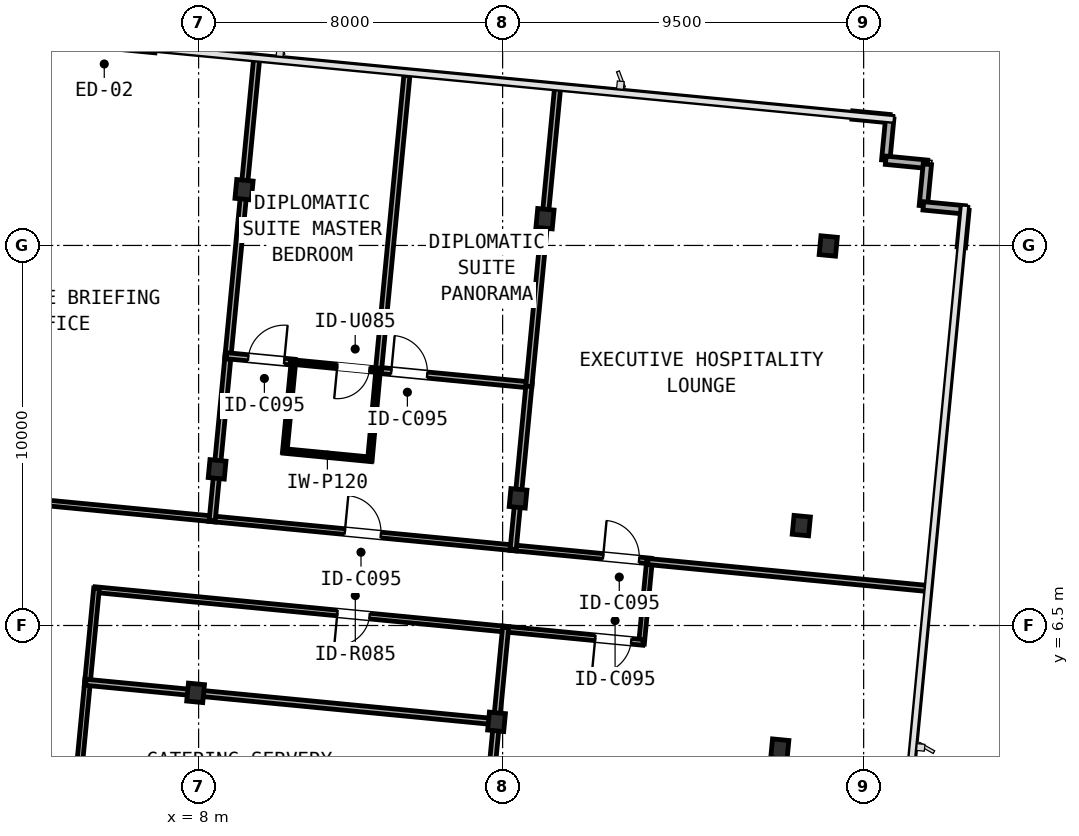
"""IFC4 building model, lengths in metres.
Left out: names, types, materials, properties, quantities, classifications, styles, units other than length and angle.
Written with IfcOpenShell. Run it as: python <this file> out.ifc"""

import sys

from ifc_helpers import new_model, si_unit, direction, frame, frame_2d, origin, origin_2d, place, context, subcontext, project, spatial, rectangle, i_section, extrude, element, fill, save


model = new_model("IFC4")
c1 = context("Model", 3, precision=1e-05, world=origin(), true_north=direction((0.0, 1.0)))
c2 = subcontext(c1, "Body", "Model", "MODEL_VIEW")
j1 = project(units=[si_unit("LENGTHUNIT", "METRE"), si_unit("PLANEANGLEUNIT", "RADIAN")], contexts=[c1])
p1 = place(None, origin())
s1 = spatial("IfcSite", under=j1, at=p1, CompositionType="ELEMENT")
p2 = place(p1, origin())
s2 = spatial("IfcBuilding", under=s1, at=p2, CompositionType="ELEMENT")
p3 = place(p2, frame((0.0, 0.0, 160.05)))
s3 = spatial("IfcBuildingStorey", under=s2, at=p3, CompositionType="ELEMENT", Elevation=160.05)
for number, where, z_axis, x_axis in (
    (1, (7.921, 4.728, 0.0), (0.0, 0.0, 1.0), (0.995, -0.096, 0.0)),
    (2, (8.487, 10.609, 0.0), (0.0, 0.0, 1.0), (0.995, -0.096, 0.0)),
):
    element("IfcColumn", number, at=place(p3, frame(where, z_axis=z_axis, x_axis=x_axis)), inside=s3, PredefinedType="COLUMN", context=c2, shape_type="SweptSolid", body=[
        extrude(i_section(OverallWidth=0.424, OverallDepth=0.474, WebThickness=0.048, FlangeThickness=0.077, FilletRadius=0.031, at=origin_2d()), origin(), (0.0, 0.0, 1.0), 3.45),
    ])
p4 = place(p3, frame((9.195, 17.967, 0.0), z_axis=(0.0, 0.0, 1.0), x_axis=(0.995396198367, -0.09584575252, 0.0)))
e3 = element("IfcColumn", 3, at=p4, inside=s3, PredefinedType="COLUMN", context=c2, shape_type="SweptSolid", body=[
    extrude(i_section(OverallWidth=0.432, OverallDepth=0.498, WebThickness=0.056, FlangeThickness=0.089, FilletRadius=0.031, at=origin_2d()), origin(), (0.0, 0.0, 1.0), 3.45),
])
for number, where, z_axis, x_axis in (
    (4, (15.84, 3.965, 0.0), (0.0, 0.0, 1.0), (0.995, -0.096, 0.0)),
    (5, (16.406, 9.846, 0.0), (0.0, 0.0, 1.0), (0.995, -0.096, 0.0)),
):
    element("IfcColumn", number, at=place(p3, frame(where, z_axis=z_axis, x_axis=x_axis)), inside=s3, PredefinedType="COLUMN", context=c2, shape_type="SweptSolid", body=[
        extrude(i_section(OverallWidth=0.424, OverallDepth=0.474, WebThickness=0.048, FlangeThickness=0.077, FilletRadius=0.031, at=origin_2d()), origin(), (0.0, 0.0, 1.0), 3.45),
    ])
for number, where, z_axis, x_axis in (
    (6, (17.115, 17.204, 0.0), (0.0, 0.0, 1.0), (0.995, -0.096, 0.0)),
    (7, (23.293, 3.248, 0.0), (0.0, 0.0, 1.0), (0.995, -0.096, 0.0)),
    (8, (23.86, 9.128, 0.0), (0.0, 0.0, 1.0), (0.995, -0.096, 0.0)),
    (9, (24.568, 16.486, 0.0), (0.0, 0.0, 1.0), (0.995, -0.096, 0.0)),
):
    element("IfcColumn", number, at=place(p3, frame(where, z_axis=z_axis, x_axis=x_axis)), inside=s3, PredefinedType="COLUMN", context=c2, shape_type="SweptSolid", body=[
        extrude(i_section(OverallWidth=0.432, OverallDepth=0.498, WebThickness=0.056, FlangeThickness=0.089, FilletRadius=0.031, at=origin_2d()), origin(), (0.0, 0.0, 1.0), 3.45),
    ])
p5 = place(p3, frame((4.275, 21.937, 0.0), z_axis=(0.0, 0.0, 1.0), x_axis=(0.995394049959, -0.095868061976, 0.0)))
e10 = element("IfcWall", 10, at=p5, inside=s3, PredefinedType="STANDARD", context=c2, shape_type="SweptSolid", body=[
    extrude(rectangle(XDim=2.6, YDim=0.24, at=frame_2d((1.3, 0.0))), origin(), (0.0, 0.0, 1.0), 3.19),
])
p6 = place(p5, frame((0.75, 0.0, 0.0)))
e11 = element("IfcOpeningElement", 11, at=p6, cuts=e10, PredefinedType="OPENING", context=c2, shape_type="SweptSolid", body=[
    extrude(rectangle(XDim=1.1, YDim=2.15, at=frame_2d((0.55, 1.075))), frame((0.0, 0.13, 0.0), z_axis=(0.0, -1.0, 0.0), x_axis=(1.0, 0.0, 0.0)), (0.0, 0.0, 1.0), 0.26),
])
p7 = place(p3, frame((25.201, 19.931, 0.0), z_axis=(0.0, 0.0, 1.0), x_axis=(0.99541083642, -0.095693608655, 0.0)))
e12 = element("IfcWall", 12, at=p7, inside=s3, PredefinedType="STANDARD", context=c2, shape_type="SweptSolid", body=[
    extrude(rectangle(XDim=0.99, YDim=0.22, at=frame_2d((0.495, 0.0))), origin(), (0.0, 0.0, 1.0), 3.19),
])
p8 = place(p3, frame((26.187, 19.837, 0.0), z_axis=(0.0, 0.0, 1.0), x_axis=(-0.095657429048, -0.995414313875, 0.0)))
e13 = element("IfcWall", 13, at=p8, inside=s3, PredefinedType="STANDARD", context=c2, shape_type="SweptSolid", body=[
    extrude(rectangle(XDim=1.1, YDim=0.22, at=frame_2d((0.55, 0.0))), origin(), (0.0, 0.0, 1.0), 3.19),
])
p9 = place(p3, frame((26.082, 18.742, 0.0), z_axis=(0.0, 0.0, 1.0), x_axis=(0.995391116058, -0.095898519656, 0.0)))
e14 = element("IfcWall", 14, at=p9, inside=s3, PredefinedType="STANDARD", context=c2, shape_type="SweptSolid", body=[
    extrude(rectangle(XDim=1.1, YDim=0.22, at=frame_2d((0.55, 0.0))), origin(), (0.0, 0.0, 1.0), 3.19),
])
p10 = place(p3, frame((27.176, 18.636, 0.0), z_axis=(0.0, 0.0, 1.0), x_axis=(-0.095657429048, -0.995414313875, 0.0)))
e15 = element("IfcWall", 15, at=p10, inside=s3, PredefinedType="STANDARD", context=c2, shape_type="SweptSolid", body=[
    extrude(rectangle(XDim=1.1, YDim=0.22, at=frame_2d((0.55, 0.0))), origin(), (0.0, 0.0, 1.0), 3.19),
])
p11 = place(p3, frame((27.071, 17.541, 0.0), z_axis=(0.0, 0.0, 1.0), x_axis=(0.995391116058, -0.095898519656, 0.0)))
e16 = element("IfcWall", 16, at=p11, inside=s3, PredefinedType="STANDARD", context=c2, shape_type="SweptSolid", body=[
    extrude(rectangle(XDim=1.1, YDim=0.22, at=frame_2d((0.55, 0.0))), origin(), (0.0, 0.0, 1.0), 3.19),
])
p12 = place(p3, frame((28.166, 17.436, 0.0), z_axis=(0.0, 0.0, 1.0), x_axis=(-0.095693608655, -0.99541083642, 0.0)))
e17 = element("IfcWall", 17, at=p12, inside=s3, PredefinedType="STANDARD", context=c2, shape_type="SweptSolid", body=[
    extrude(rectangle(XDim=0.99, YDim=0.22, at=frame_2d((0.495, 0.0))), origin(), (0.0, 0.0, 1.0), 3.19),
])
p13 = place(p3, frame((-7.559, 10.84, 0.0), z_axis=(0.0, 0.0, 1.0), x_axis=(0.995396443768, -0.095843203903, 0.0)))
e18 = element("IfcWall", 18, at=p13, inside=s3, PredefinedType="PARTITIONING", context=c2, shape_type="SweptSolid", body=[
    extrude(rectangle(XDim=16.076, YDim=0.15, at=frame_2d((8.038, 0.0))), origin(), (0.0, 0.0, 1.0), 2.479),
])
p14 = place(p13, frame((3.532, 0.0, 0.0)))
e19 = element("IfcOpeningElement", 19, at=p14, cuts=e18, PredefinedType="OPENING", context=c2, shape_type="SweptSolid", body=[
    extrude(rectangle(XDim=0.95, YDim=2.15, at=frame_2d((0.475, 1.075))), frame((0.0, 0.085, 0.0), z_axis=(0.0, -1.0, 0.0), x_axis=(1.0, 0.0, 0.0)), (0.0, 0.0, 1.0), 0.17),
])
p15 = place(p3, frame((8.28, 9.314, 0.0), z_axis=(0.0, 0.0, 1.0), x_axis=(0.995395467524, -0.095853342309, 0.0)))
e20 = element("IfcWall", 20, at=p15, inside=s3, PredefinedType="PARTITIONING", context=c2, shape_type="SweptSolid", body=[
    extrude(rectangle(XDim=8.12, YDim=0.15, at=frame_2d((4.06, 0.0))), origin(), (0.0, 0.0, 1.0), 2.479),
])
p16 = place(p15, frame((3.585, 0.0, 0.0)))
e21 = element("IfcOpeningElement", 21, at=p16, cuts=e20, PredefinedType="OPENING", context=c2, shape_type="SweptSolid", body=[
    extrude(rectangle(XDim=0.95, YDim=2.15, at=frame_2d((0.475, 1.075))), frame((0.0, 0.085, 0.0), z_axis=(0.0, -1.0, 0.0), x_axis=(1.0, 0.0, 0.0)), (0.0, 0.0, 1.0), 0.17),
])
p17 = place(p3, frame((16.199, 8.552, 0.0), z_axis=(0.0, 0.0, 1.0), x_axis=(0.995391104887, -0.095898635608, 0.0)))
e22 = element("IfcWall", 22, at=p17, inside=s3, PredefinedType="PARTITIONING", context=c2, shape_type="SweptSolid", body=[
    extrude(rectangle(XDim=3.722, YDim=0.15, at=frame_2d((1.861, 0.0))), origin(), (0.0, 0.0, 1.0), 2.479),
])
p18 = place(p17, frame((2.457, 0.0, 0.0)))
e23 = element("IfcOpeningElement", 23, at=p18, cuts=e22, PredefinedType="OPENING", context=c2, shape_type="SweptSolid", body=[
    extrude(rectangle(XDim=0.95, YDim=2.15, at=frame_2d((0.475, 1.075))), frame((0.0, 0.085, 0.0), z_axis=(0.0, -1.0, 0.0), x_axis=(1.0, 0.0, 0.0)), (0.0, 0.0, 1.0), 0.17),
])
p19 = place(p3, frame((16.156, 6.396, 0.0), z_axis=(0.0, 0.0, 1.0), x_axis=(-0.99539478422, 0.095860437863, 0.0)))
e24 = element("IfcWall", 24, at=p19, inside=s3, PredefinedType="PARTITIONING", context=c2, shape_type="SweptSolid", body=[
    extrude(rectangle(XDim=10.936, YDim=0.15, at=frame_2d((5.468, 0.0))), origin(), (0.0, 0.0, 1.0), 2.479),
])
p20 = place(p19, frame((3.675, 0.0, 0.0)))
e25 = element("IfcOpeningElement", 25, at=p20, cuts=e24, PredefinedType="OPENING", context=c2, shape_type="SweptSolid", body=[
    extrude(rectangle(XDim=0.85, YDim=2.05, at=frame_2d((0.425, 1.025))), frame((0.0, 0.085, 0.0), z_axis=(0.0, -1.0, 0.0), x_axis=(1.0, 0.0, 0.0)), (0.0, 0.0, 1.0), 0.17),
])
p21 = place(p3, frame((5.314, 7.48, 0.0), z_axis=(0.0, 0.0, 1.0), x_axis=(-0.09587519517, -0.995393362923, 0.0)))
e26 = element("IfcWall", 26, at=p21, inside=s3, PredefinedType="PARTITIONING", context=c2, shape_type="SweptSolid", body=[
    extrude(rectangle(XDim=2.572, YDim=0.15, at=frame_2d((1.286, 0.0))), origin(), (0.0, 0.0, 1.0), 2.479),
])
p22 = place(p3, frame((5.084, 5.083, 0.0), z_axis=(0.0, 0.0, 1.0), x_axis=(-0.095867331855, -0.995394120277, 0.0)))
e27 = element("IfcWall", 27, at=p22, inside=s3, PredefinedType="PARTITIONING", context=c2, shape_type="SweptSolid", body=[
    extrude(rectangle(XDim=4.594, YDim=0.15, at=frame_2d((2.297, 0.0))), origin(), (0.0, 0.0, 1.0), 2.479),
])
p23 = place(p3, frame((19.866, 8.219, 0.0), z_axis=(0.0, 0.0, 1.0), x_axis=(-0.095773447772, -0.995403157872, 0.0)))
e28 = element("IfcWall", 28, at=p23, inside=s3, PredefinedType="PARTITIONING", context=c2, shape_type="SweptSolid", body=[
    extrude(rectangle(XDim=2.21, YDim=0.15, at=frame_2d((1.105, 0.0))), origin(), (0.0, 0.0, 1.0), 2.718),
])
p24 = place(p3, frame((19.698, 6.055, 0.0), z_axis=(0.0, 0.0, 1.0), x_axis=(-0.995397364202, 0.095833644092, 0.0)))
e29 = element("IfcWall", 29, at=p24, inside=s3, PredefinedType="PARTITIONING", context=c2, shape_type="SweptSolid", body=[
    extrude(rectangle(XDim=3.722, YDim=0.15, at=frame_2d((1.861, 0.0))), origin(), (0.0, 0.0, 1.0), 2.479),
])
p25 = place(p24, frame((0.315, 0.0, 0.0)))
e30 = element("IfcOpeningElement", 30, at=p25, cuts=e29, PredefinedType="OPENING", context=c2, shape_type="SweptSolid", body=[
    extrude(rectangle(XDim=0.95, YDim=2.15, at=frame_2d((0.475, 1.075))), frame((0.0, 0.085, 0.0), z_axis=(0.0, -1.0, 0.0), x_axis=(1.0, 0.0, 0.0)), (0.0, 0.0, 1.0), 0.17),
])
p26 = place(p3, frame((8.47, 10.433, 0.0), z_axis=(0.0, 0.0, 1.0), x_axis=(-0.095831494917, -0.995397571115, 0.0)))
e31 = element("IfcWall", 31, at=p26, inside=s3, PredefinedType="PARTITIONING", context=c2, shape_type="SweptSolid", body=[
    extrude(rectangle(XDim=1.172, YDim=0.16, at=frame_2d((0.586, 0.0))), origin(), (0.0, 0.0, 1.0), 2.479),
])
p27 = place(p3, frame((8.782, 13.677, 0.0), z_axis=(0.0, 0.0, 1.0), x_axis=(-0.095851667856, -0.995395628767, 0.0)))
e32 = element("IfcWall", 32, at=p27, inside=s3, PredefinedType="PARTITIONING", context=c2, shape_type="SweptSolid", body=[
    extrude(rectangle(XDim=2.906, YDim=0.16, at=frame_2d((1.453, 0.0))), origin(), (0.0, 0.0, 1.0), 2.479),
])
p28 = place(p3, frame((9.178, 17.791, 0.0), z_axis=(0.0, 0.0, 1.0), x_axis=(-0.095830387623, -0.995397677719, 0.0)))
e33 = element("IfcWall", 33, at=p28, inside=s3, PredefinedType="PARTITIONING", context=c2, shape_type="SweptSolid", body=[
    extrude(rectangle(XDim=4.298, YDim=0.16, at=frame_2d((2.149, 0.0))), origin(), (0.0, 0.0, 1.0), 2.479),
])
p29 = place(p3, frame((9.533, 21.47, 0.0), z_axis=(0.0, 0.0, 1.0), x_axis=(-0.095859866796, -0.995394839216, 0.0)))
e34 = element("IfcWall", 34, at=p29, inside=s3, PredefinedType="PARTITIONING", context=c2, shape_type="SweptSolid", body=[
    extrude(rectangle(XDim=3.344, YDim=0.16, at=frame_2d((1.672, 0.0))), origin(), (0.0, 0.0, 1.0), 3.19),
])
p30 = place(p3, frame((8.735, 13.599, 0.0), z_axis=(0.0, 0.0, 1.0), x_axis=(0.995394173932, -0.095866774755, 0.0)))
e35 = element("IfcWall", 35, at=p30, inside=s3, PredefinedType="PARTITIONING", context=c2, shape_type="SweptSolid", body=[
    extrude(rectangle(XDim=1.808, YDim=0.16, at=frame_2d((0.904, 0.0))), origin(), (0.0, 0.0, 1.0), 2.479),
])
p31 = place(p30, frame((0.574, 0.0, 0.0)))
e36 = element("IfcOpeningElement", 36, at=p31, cuts=e35, PredefinedType="OPENING", context=c2, shape_type="SweptSolid", body=[
    extrude(rectangle(XDim=0.95, YDim=2.15, at=frame_2d((0.475, 1.075))), frame((0.0, 0.09, 0.0), z_axis=(0.0, -1.0, 0.0), x_axis=(1.0, 0.0, 0.0)), (0.0, 0.0, 1.0), 0.18),
])
p32 = place(p3, frame((12.684, 13.218, 0.0), z_axis=(0.0, 0.0, 1.0), x_axis=(0.995396485523, -0.095842770251, 0.0)))
e37 = element("IfcWall", 37, at=p32, inside=s3, PredefinedType="PARTITIONING", context=c2, shape_type="SweptSolid", body=[
    extrude(rectangle(XDim=4.068, YDim=0.16, at=frame_2d((2.034, 0.0))), origin(), (0.0, 0.0, 1.0), 2.479),
])
p33 = place(p32, frame((0.386, 0.0, 0.0)))
e38 = element("IfcOpeningElement", 38, at=p33, cuts=e37, PredefinedType="OPENING", context=c2, shape_type="SweptSolid", body=[
    extrude(rectangle(XDim=0.95, YDim=2.15, at=frame_2d((0.475, 1.075))), frame((0.0, 0.09, 0.0), z_axis=(0.0, -1.0, 0.0), x_axis=(1.0, 0.0, 0.0)), (0.0, 0.0, 1.0), 0.18),
])
p34 = place(p3, frame((10.498, 13.469, 0.0), z_axis=(0.0, 0.0, 1.0), x_axis=(-0.095842578202, -0.995396504014, 0.0)))
e39 = element("IfcWall", 39, at=p34, inside=s3, PredefinedType="PARTITIONING", context=c2, shape_type="SweptSolid", body=[
    extrude(rectangle(XDim=2.43, YDim=0.12, at=frame_2d((1.215, 0.0))), origin(), (0.0, 0.0, 1.0), 3.19),
])
p35 = place(p3, frame((10.229, 11.094, 0.0), z_axis=(0.0, 0.0, 1.0), x_axis=(0.995403652262, -0.095768309281, 0.0)))
e40 = element("IfcWall", 40, at=p35, inside=s3, PredefinedType="PARTITIONING", context=c2, shape_type="SweptSolid", body=[
    extrude(rectangle(XDim=2.33, YDim=0.12, at=frame_2d((1.165, 0.0))), origin(), (0.0, 0.0, 1.0), 2.718),
])
p36 = place(p3, frame((12.505, 10.834, 0.0), z_axis=(0.0, 0.0, 1.0), x_axis=(0.091622673793, 0.995793796751, 0.0)))
e41 = element("IfcWall", 41, at=p36, inside=s3, PredefinedType="PARTITIONING", context=c2, shape_type="SweptSolid", body=[
    extrude(rectangle(XDim=2.43, YDim=0.12, at=frame_2d((1.215, 0.0))), origin(), (0.0, 0.0, 1.0), 2.718),
])
p37 = place(p3, frame((16.389, 9.671, 0.0), z_axis=(0.0, 0.0, 1.0), x_axis=(-0.095811626391, -0.995399483749, 0.0)))
e42 = element("IfcWall", 42, at=p37, inside=s3, PredefinedType="PARTITIONING", context=c2, shape_type="SweptSolid", body=[
    extrude(rectangle(XDim=1.172, YDim=0.16, at=frame_2d((0.586, 0.0))), origin(), (0.0, 0.0, 1.0), 2.479),
])
p38 = place(p3, frame((16.698, 12.872, 0.0), z_axis=(0.0, 0.0, 1.0), x_axis=(-0.095899197745, -0.995391050729, 0.0)))
e43 = element("IfcWall", 43, at=p38, inside=s3, PredefinedType="PARTITIONING", context=c2, shape_type="SweptSolid", body=[
    extrude(rectangle(XDim=2.864, YDim=0.16, at=frame_2d((1.432, 0.0))), origin(), (0.0, 0.0, 1.0), 2.479),
])
p39 = place(p3, frame((13.481, 20.97, 0.0), z_axis=(0.0, 0.0, 1.0), x_axis=(-0.095851985855, -0.995395598146, 0.0)))
e44 = element("IfcWall", 44, at=p39, inside=s3, PredefinedType="PARTITIONING", context=c2, shape_type="SweptSolid", body=[
    extrude(rectangle(XDim=7.832, YDim=0.16, at=frame_2d((3.916, 0.0))), origin(), (0.0, 0.0, 1.0), 2.557),
])
p40 = place(p3, frame((12.774, 13.21, 0.0), z_axis=(0.0, 0.0, 1.0), x_axis=(-0.995398273854, 0.095824195322, 0.0)))
e45 = element("IfcWall", 45, at=p40, inside=s3, PredefinedType="PARTITIONING", context=c2, shape_type="SweptSolid", body=[
    extrude(rectangle(XDim=2.372, YDim=0.12, at=frame_2d((1.186, 0.0))), origin(), (0.0, 0.0, 1.0), 2.718),
])
p41 = place(p40, frame((0.28, 0.0, 0.0)))
e46 = element("IfcOpeningElement", 46, at=p41, cuts=e45, PredefinedType="OPENING", context=c2, shape_type="SweptSolid", body=[
    extrude(rectangle(XDim=0.85, YDim=2.1, at=frame_2d((0.425, 1.05))), frame((0.0, 0.07, 0.0), z_axis=(0.0, -1.0, 0.0), x_axis=(1.0, 0.0, 0.0)), (0.0, 0.0, 1.0), 0.14),
])
p42 = place(p3, frame((17.098, 17.029, 0.0), z_axis=(0.0, 0.0, 1.0), x_axis=(-0.095856690152, -0.995395145132, 0.0)))
e47 = element("IfcWall", 47, at=p42, inside=s3, PredefinedType="PARTITIONING", context=c2, shape_type="SweptSolid", body=[
    extrude(rectangle(XDim=4.256, YDim=0.16, at=frame_2d((2.128, 0.0))), origin(), (0.0, 0.0, 1.0), 2.479),
])
p43 = place(p3, frame((17.452, 20.708, 0.0), z_axis=(0.0, 0.0, 1.0), x_axis=(-0.095859866796, -0.995394839216, 0.0)))
e48 = element("IfcWall", 48, at=p43, inside=s3, PredefinedType="PARTITIONING", context=c2, shape_type="SweptSolid", body=[
    extrude(rectangle(XDim=3.344, YDim=0.16, at=frame_2d((1.672, 0.0))), origin(), (0.0, 0.0, 1.0), 3.19),
])
p44 = place(p3, frame((27.236, 7.469, 0.0), z_axis=(0.0, 0.0, 1.0), x_axis=(-0.995396228159, 0.095845443117, 0.0)))
e49 = element("IfcWall", 49, at=p44, inside=s3, PredefinedType="PARTITIONING", context=c2, shape_type="SweptSolid", body=[
    extrude(rectangle(XDim=7.448, YDim=0.16, at=frame_2d((3.724, 0.0))), origin(), (0.0, 0.0, 1.0), 2.557),
])
p45 = place(p3, frame((7.745, 4.745, 0.0), z_axis=(0.0, 0.0, 1.0), x_axis=(-0.995392910691, 0.095879890208, 0.0)))
e50 = element("IfcWall", 50, at=p45, inside=s3, PredefinedType="PARTITIONING", context=c2, shape_type="SweptSolid", body=[
    extrude(rectangle(XDim=2.722, YDim=0.16, at=frame_2d((1.361, 0.0))), origin(), (0.0, 0.0, 1.0), 2.479),
])
p46 = place(p3, frame((15.665, 3.982, 0.0), z_axis=(0.0, 0.0, 1.0), x_axis=(-0.995396667246, 0.095840882902, 0.0)))
e51 = element("IfcWall", 51, at=p46, inside=s3, PredefinedType="PARTITIONING", context=c2, shape_type="SweptSolid", body=[
    extrude(rectangle(XDim=7.604, YDim=0.16, at=frame_2d((3.802, 0.0))), origin(), (0.0, 0.0, 1.0), 2.479),
])
p47 = place(p3, frame((16.079, 6.444, 0.0), z_axis=(0.0, 0.0, 1.0), x_axis=(-0.095794827695, -0.995401100555, 0.0)))
e52 = element("IfcWall", 52, at=p47, inside=s3, PredefinedType="PARTITIONING", context=c2, shape_type="SweptSolid", body=[
    extrude(rectangle(XDim=2.314, YDim=0.16, at=frame_2d((1.157, 0.0))), origin(), (0.0, 0.0, 1.0), 2.479),
])
p48 = place(p3, frame((15.823, 3.79, 0.0), z_axis=(0.0, 0.0, 1.0), x_axis=(-0.095865726078, -0.99539427493, 0.0)))
e53 = element("IfcWall", 53, at=p48, inside=s3, PredefinedType="PARTITIONING", context=c2, shape_type="SweptSolid", body=[
    extrude(rectangle(XDim=6.008, YDim=0.16, at=frame_2d((3.004, 0.0))), origin(), (0.0, 0.0, 1.0), 2.225),
])
p49 = place(p16, frame((0.95, 0.0, 0.0), z_axis=(0.0, 0.0, 1.0), x_axis=(-1.0, 0.0, 0.0)))
e54 = element("IfcDoor", 54, at=p49, inside=s3, OperationType="SINGLE_SWING_LEFT", PredefinedType="DOOR", context=c2, shape_type="SweptSolid", body=[
    extrude(rectangle(XDim=0.95, YDim=2.15, at=frame_2d((0.475, 1.075))), frame((0.0, 0.025, 0.0), z_axis=(0.0, -1.0, 0.0), x_axis=(1.0, 0.0, 0.0)), (0.0, 0.0, 1.0), 0.05),
])
fill(e21, e54)
p50 = place(p31, origin())
e55 = element("IfcDoor", 55, at=p50, inside=s3, OperationType="SINGLE_SWING_RIGHT", PredefinedType="DOOR", context=c2, shape_type="SweptSolid", body=[
    extrude(rectangle(XDim=0.95, YDim=2.15, at=frame_2d((0.475, 1.075))), frame((0.0, 0.025, 0.0), z_axis=(0.0, -1.0, 0.0), x_axis=(1.0, 0.0, 0.0)), (0.0, 0.0, 1.0), 0.05),
])
fill(e36, e55)
p51 = place(p33, origin())
e56 = element("IfcDoor", 56, at=p51, inside=s3, OperationType="SINGLE_SWING_LEFT", PredefinedType="DOOR", context=c2, shape_type="SweptSolid", body=[
    extrude(rectangle(XDim=0.95, YDim=2.15, at=frame_2d((0.475, 1.075))), frame((0.0, 0.025, 0.0), z_axis=(0.0, -1.0, 0.0), x_axis=(1.0, 0.0, 0.0)), (0.0, 0.0, 1.0), 0.05),
])
fill(e38, e56)
p52 = place(p41, frame((0.85, 0.0, 0.0), z_axis=(0.0, 0.0, 1.0), x_axis=(-1.0, 0.0, 0.0)))
e57 = element("IfcDoor", 57, at=p52, inside=s3, OperationType="SINGLE_SWING_RIGHT", PredefinedType="DOOR", context=c2, shape_type="SweptSolid", body=[
    extrude(rectangle(XDim=0.85, YDim=2.1, at=frame_2d((0.425, 1.05))), frame((0.0, 0.025, 0.0), z_axis=(0.0, -1.0, 0.0), x_axis=(1.0, 0.0, 0.0)), (0.0, 0.0, 1.0), 0.05),
])
fill(e46, e57)
p53 = place(p18, frame((0.95, 0.0, 0.0), z_axis=(0.0, 0.0, 1.0), x_axis=(-1.0, 0.0, 0.0)))
e58 = element("IfcDoor", 58, at=p53, inside=s3, OperationType="SINGLE_SWING_LEFT", PredefinedType="DOOR", context=c2, shape_type="SweptSolid", body=[
    extrude(rectangle(XDim=0.95, YDim=2.15, at=frame_2d((0.475, 1.075))), frame((0.0, 0.025, 0.0), z_axis=(0.0, -1.0, 0.0), x_axis=(1.0, 0.0, 0.0)), (0.0, 0.0, 1.0), 0.05),
])
fill(e23, e58)
p54 = place(p20, frame((0.85, 0.0, 0.0), z_axis=(0.0, 0.0, 1.0), x_axis=(-1.0, 0.0, 0.0)))
e59 = element("IfcDoor", 59, at=p54, inside=s3, OperationType="SINGLE_SWING_RIGHT", PredefinedType="DOOR", context=c2, shape_type="SweptSolid", body=[
    extrude(rectangle(XDim=0.85, YDim=2.05, at=frame_2d((0.425, 1.025))), frame((0.0, 0.025, 0.0), z_axis=(0.0, -1.0, 0.0), x_axis=(1.0, 0.0, 0.0)), (0.0, 0.0, 1.0), 0.05),
])
fill(e25, e59)
p55 = place(p25, frame((0.95, 0.0, 0.0), z_axis=(0.0, 0.0, 1.0), x_axis=(-1.0, 0.0, 0.0)))
e60 = element("IfcDoor", 60, at=p55, inside=s3, OperationType="SINGLE_SWING_RIGHT", PredefinedType="DOOR", context=c2, shape_type="SweptSolid", body=[
    extrude(rectangle(XDim=0.95, YDim=2.15, at=frame_2d((0.475, 1.075))), frame((0.0, 0.025, 0.0), z_axis=(0.0, -1.0, 0.0), x_axis=(1.0, 0.0, 0.0)), (0.0, 0.0, 1.0), 0.05),
])
fill(e30, e60)
save(model, sys.argv[1])
